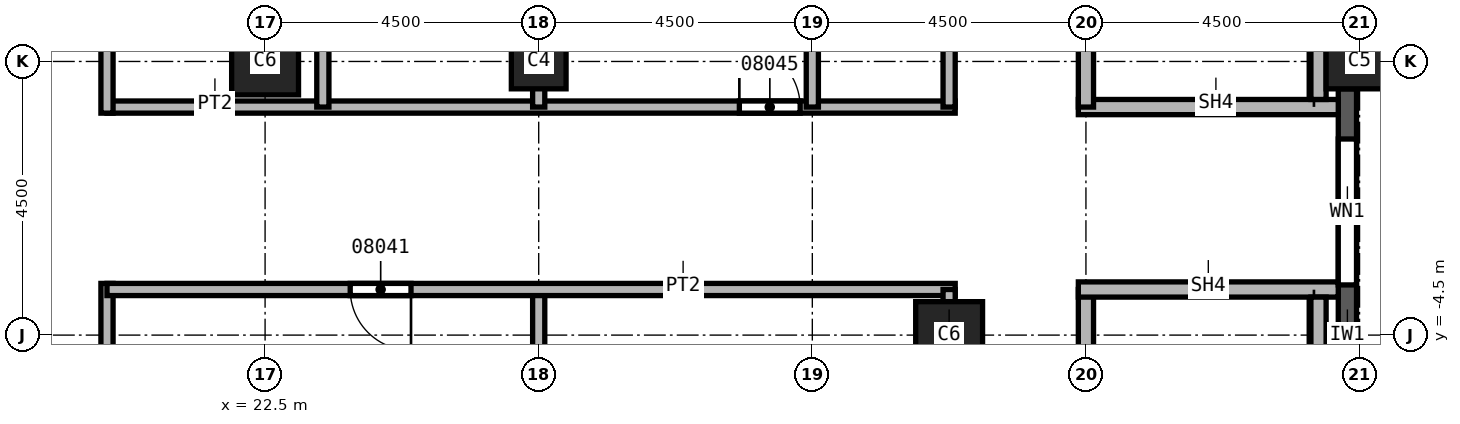
"""IFC4 building model, lengths in metres.
Left out: names, types, materials, properties, quantities, classifications, styles, units other than length and angle.
Written with IfcOpenShell. Run it as: python <this file> out.ifc"""

import sys

from ifc_helpers import new_model, si_unit, direction, frame, frame_2d, origin, origin_2d, place, context, subcontext, project, spatial, rectangle, extrude, element, fill, save


model = new_model("IFC4")
c1 = context("Model", 3, precision=1e-05, world=origin(), true_north=direction((0.0, 1.0)))
c2 = subcontext(c1, "Body", "Model", "MODEL_VIEW")
j1 = project(units=[si_unit("LENGTHUNIT", "METRE"), si_unit("PLANEANGLEUNIT", "RADIAN")], contexts=[c1])
p1 = place(None, origin())
s1 = spatial("IfcSite", under=j1, at=p1, CompositionType="ELEMENT")
p2 = place(p1, origin())
s2 = spatial("IfcBuilding", under=s1, at=p2, CompositionType="ELEMENT")
p3 = place(p2, frame((0.0, 0.0, 150.0)))
s3 = spatial("IfcBuildingStorey", under=s2, at=p3, CompositionType="ELEMENT", Elevation=150.0)
p4 = place(p3, frame((40.5, 0.0, 0.0), z_axis=(0.0, 0.0, 1.0), x_axis=(0.0, 1.0, 0.0)))
e1 = element("IfcColumn", 1, at=p4, inside=s3, PredefinedType="COLUMN", context=c2, shape_type="SweptSolid", body=[
    extrude(rectangle(XDim=0.9, YDim=1.1, at=origin_2d()), origin(), (0.0, 0.0, 1.0), 3.7),
])
for number, where, z_axis, x_axis in (
    (2, (33.75, -4.5, 0.0), (0.0, 0.0, 1.0), (1.0, 0.0, 0.0)),
    (3, (22.5, 0.0, 0.0), (0.0, 0.0, 1.0), (1.0, 0.0, 0.0)),
):
    element("IfcColumn", number, at=place(p3, frame(where, z_axis=z_axis, x_axis=x_axis)), inside=s3, PredefinedType="COLUMN", context=c2, shape_type="SweptSolid", body=[
        extrude(rectangle(XDim=1.1, YDim=1.1, at=origin_2d()), origin(), (0.0, 0.0, 1.0), 3.7),
    ])
p5 = place(p3, frame((27.0, 0.0, 0.0), z_axis=(0.0, 0.0, 1.0), x_axis=(1.0, 0.0, 0.0)))
e4 = element("IfcColumn", 4, at=p5, inside=s3, PredefinedType="COLUMN", context=c2, shape_type="SweptSolid", body=[
    extrude(rectangle(XDim=0.9, YDim=0.9, at=origin_2d()), origin(), (0.0, 0.0, 1.0), 3.7),
])
p6 = place(p3, frame((40.3, -8.55, 0.0), z_axis=(0.0, 0.0, 1.0), x_axis=(0.0, 1.0, 0.0)))
e5 = element("IfcWall", 5, at=p6, inside=s3, PredefinedType="SOLIDWALL", context=c2, shape_type="SweptSolid", body=[
    extrude(rectangle(XDim=8.1, YDim=0.3, at=frame_2d((4.05, 0.0))), origin(), (0.0, 0.0, 1.0), 3.1),
])
p7 = place(p6, frame((0.825, 0.0, 0.8)))
e6 = element("IfcOpeningElement", 6, at=p7, cuts=e5, PredefinedType="OPENING", context=c2, shape_type="SweptSolid", body=[
    extrude(rectangle(XDim=2.4, YDim=1.95, at=frame_2d((1.2, 0.975))), frame((0.0, 0.15, 0.0), z_axis=(0.0, -1.0, 0.0), x_axis=(1.0, 0.0, 0.0)), (0.0, 0.0, 1.0), 0.3),
])
p8 = place(p6, frame((4.875, 0.0, 0.8)))
e7 = element("IfcOpeningElement", 7, at=p8, cuts=e5, PredefinedType="OPENING", context=c2, shape_type="SweptSolid", body=[
    extrude(rectangle(XDim=2.4, YDim=1.95, at=frame_2d((1.2, 0.975))), frame((0.0, 0.15, 0.0), z_axis=(0.0, -1.0, 0.0), x_axis=(1.0, 0.0, 0.0)), (0.0, 0.0, 1.0), 0.3),
])
p9 = place(p3, frame((19.9, -3.65, 0.0), z_axis=(0.0, 0.0, 1.0), x_axis=(0.0, -1.0, 0.0)))
e8 = element("IfcWall", 8, at=p9, inside=s3, PredefinedType="PARTITIONING", context=c2, shape_type="SweptSolid", body=[
    extrude(rectangle(XDim=19.6, YDim=0.2, at=frame_2d((9.8, 0.0))), origin(), (0.0, 0.0, 1.0), 3.7),
])
p10 = place(p9, frame((17.35, 0.0, 0.0)))
e9 = element("IfcOpeningElement", 9, at=p10, cuts=e8, PredefinedType="OPENING", context=c2, shape_type="SweptSolid", body=[
    extrude(rectangle(XDim=1.0, YDim=2.1, at=frame_2d((0.5, 1.05))), frame((0.0, 0.1, 0.0), z_axis=(0.0, -1.0, 0.0), x_axis=(1.0, 0.0, 0.0)), (0.0, 0.0, 1.0), 0.2),
])
p11 = place(p9, frame((9.4, 0.0, 0.0)))
e10 = element("IfcOpeningElement", 10, at=p11, cuts=e8, PredefinedType="OPENING", context=c2, shape_type="SweptSolid", body=[
    extrude(rectangle(XDim=1.0, YDim=2.1, at=frame_2d((0.5, 1.05))), frame((0.0, 0.1, 0.0), z_axis=(0.0, -1.0, 0.0), x_axis=(1.0, 0.0, 0.0)), (0.0, 0.0, 1.0), 0.2),
])
p12 = place(p3, frame((19.9, -0.75, 0.0), z_axis=(0.0, 0.0, 1.0), x_axis=(1.0, 0.0, 0.0)))
e11 = element("IfcWall", 11, at=p12, inside=s3, PredefinedType="PARTITIONING", context=c2, shape_type="SweptSolid", body=[
    extrude(rectangle(XDim=13.95, YDim=0.2, at=frame_2d((6.975, 0.0))), origin(), (0.0, 0.0, 1.0), 3.7),
])
p13 = place(p12, frame((10.4, 0.0, 0.0)))
e12 = element("IfcOpeningElement", 12, at=p13, cuts=e11, PredefinedType="OPENING", context=c2, shape_type="SweptSolid", body=[
    extrude(rectangle(XDim=1.0, YDim=2.1, at=frame_2d((0.5, 1.05))), frame((0.0, 0.1, 0.0), z_axis=(0.0, -1.0, 0.0), x_axis=(1.0, 0.0, 0.0)), (0.0, 0.0, 1.0), 0.2),
])
p14 = place(p3, frame((19.9, 23.25, 0.0), z_axis=(0.0, 0.0, 1.0), x_axis=(0.0, -1.0, 0.0)))
e13 = element("IfcWall", 13, at=p14, inside=s3, PredefinedType="PARTITIONING", context=c2, shape_type="SweptSolid", body=[
    extrude(rectangle(XDim=24.1, YDim=0.2, at=frame_2d((12.05, 0.0))), origin(), (0.0, 0.0, 1.0), 3.7),
])
p15 = place(p14, frame((12.6, 0.0, 0.0)))
e14 = element("IfcOpeningElement", 14, at=p15, cuts=e13, PredefinedType="OPENING", context=c2, shape_type="SweptSolid", body=[
    extrude(rectangle(XDim=1.0, YDim=2.1, at=frame_2d((0.5, 1.05))), frame((0.0, 0.1, 0.0), z_axis=(0.0, -1.0, 0.0), x_axis=(1.0, 0.0, 0.0)), (0.0, 0.0, 1.0), 0.2),
])
p16 = place(p14, frame((5.05, 0.0, 0.0)))
e15 = element("IfcOpeningElement", 15, at=p16, cuts=e13, PredefinedType="OPENING", context=c2, shape_type="SweptSolid", body=[
    extrude(rectangle(XDim=1.0, YDim=2.1, at=frame_2d((0.5, 1.05))), frame((0.0, 0.1, 0.0), z_axis=(0.0, -1.0, 0.0), x_axis=(1.0, 0.0, 0.0)), (0.0, 0.0, 1.0), 0.2),
])
p17 = place(p3, frame((23.45, 15.85, 0.0), z_axis=(0.0, 0.0, 1.0), x_axis=(0.0, -1.0, 0.0)))
e16 = element("IfcWall", 16, at=p17, inside=s3, PredefinedType="PARTITIONING", context=c2, shape_type="SweptSolid", body=[
    extrude(rectangle(XDim=16.6, YDim=0.2, at=frame_2d((8.3, 0.0))), origin(), (0.0, 0.0, 1.0), 3.7),
])
p18 = place(p17, frame((10.45, 0.0, 0.0)))
e17 = element("IfcOpeningElement", 17, at=p18, cuts=e16, PredefinedType="OPENING", context=c2, shape_type="SweptSolid", body=[
    extrude(rectangle(XDim=1.0, YDim=2.1, at=frame_2d((0.5, 1.05))), frame((0.0, 0.1, 0.0), z_axis=(0.0, -1.0, 0.0), x_axis=(1.0, 0.0, 0.0)), (0.0, 0.0, 1.0), 0.2),
])
p19 = place(p3, frame((27.0, -3.75, 0.0), z_axis=(0.0, 0.0, 1.0), x_axis=(0.0, -1.0, 0.0)))
e18 = element("IfcWall", 18, at=p19, inside=s3, PredefinedType="PARTITIONING", context=c2, shape_type="SweptSolid", body=[
    extrude(rectangle(XDim=13.7, YDim=0.2, at=frame_2d((6.85, 0.0))), origin(), (0.0, 0.0, 1.0), 3.7),
])
p20 = place(p3, frame((27.0, 17.45, 0.0), z_axis=(0.0, 0.0, 1.0), x_axis=(0.0, -1.0, 0.0)))
e19 = element("IfcWall", 19, at=p20, inside=s3, PredefinedType="PARTITIONING", context=c2, shape_type="SweptSolid", body=[
    extrude(rectangle(XDim=18.2, YDim=0.2, at=frame_2d((9.1, 0.0))), origin(), (0.0, 0.0, 1.0), 3.7),
])
p21 = place(p3, frame((33.85, -3.75, 0.0), z_axis=(0.0, 0.0, 1.0), x_axis=(-1.0, 0.0, 0.0)))
e20 = element("IfcWall", 20, at=p21, inside=s3, PredefinedType="PARTITIONING", context=c2, shape_type="SweptSolid", body=[
    extrude(rectangle(XDim=13.95, YDim=0.2, at=frame_2d((6.975, 0.0))), origin(), (0.0, 0.0, 1.0), 3.7),
])
p22 = place(p21, frame((8.95, 0.0, 0.0)))
e21 = element("IfcOpeningElement", 21, at=p22, cuts=e20, PredefinedType="OPENING", context=c2, shape_type="SweptSolid", body=[
    extrude(rectangle(XDim=1.0, YDim=2.1, at=frame_2d((0.5, 1.05))), frame((0.0, 0.1, 0.0), z_axis=(0.0, -1.0, 0.0), x_axis=(1.0, 0.0, 0.0)), (0.0, 0.0, 1.0), 0.2),
])
p23 = place(p3, frame((31.5, 17.45, 0.0), z_axis=(0.0, 0.0, 1.0), x_axis=(0.0, -1.0, 0.0)))
e22 = element("IfcWall", 22, at=p23, inside=s3, PredefinedType="PARTITIONING", context=c2, shape_type="SweptSolid", body=[
    extrude(rectangle(XDim=18.2, YDim=0.2, at=frame_2d((9.1, 0.0))), origin(), (0.0, 0.0, 1.0), 3.7),
])
p24 = place(p3, frame((33.75, -11.25, 0.0), z_axis=(0.0, 0.0, 1.0), x_axis=(0.0, 1.0, 0.0)))
e23 = element("IfcWall", 23, at=p24, inside=s3, PredefinedType="PARTITIONING", context=c2, shape_type="SweptSolid", body=[
    extrude(rectangle(XDim=7.5, YDim=0.2, at=frame_2d((3.75, 0.0))), origin(), (0.0, 0.0, 1.0), 3.7),
])
p25 = place(p24, frame((3.25, 0.0, 0.0)))
e24 = element("IfcOpeningElement", 24, at=p25, cuts=e23, PredefinedType="OPENING", context=c2, shape_type="SweptSolid", body=[
    extrude(rectangle(XDim=1.0, YDim=2.1, at=frame_2d((0.5, 1.05))), frame((0.0, 0.1, 0.0), z_axis=(0.0, -1.0, 0.0), x_axis=(1.0, 0.0, 0.0)), (0.0, 0.0, 1.0), 0.2),
])
p26 = place(p3, frame((33.75, -0.75, 0.0), z_axis=(0.0, 0.0, 1.0), x_axis=(0.0, 1.0, 0.0)))
e25 = element("IfcWall", 25, at=p26, inside=s3, PredefinedType="PARTITIONING", context=c2, shape_type="SweptSolid", body=[
    extrude(rectangle(XDim=7.5, YDim=0.2, at=frame_2d((3.75, 0.0))), origin(), (0.0, 0.0, 1.0), 3.7),
])
p27 = place(p26, frame((3.4, 0.0, 0.0)))
e26 = element("IfcOpeningElement", 26, at=p27, cuts=e25, PredefinedType="OPENING", context=c2, shape_type="SweptSolid", body=[
    extrude(rectangle(XDim=1.0, YDim=2.1, at=frame_2d((0.5, 1.05))), frame((0.0, 0.1, 0.0), z_axis=(0.0, -1.0, 0.0), x_axis=(1.0, 0.0, 0.0)), (0.0, 0.0, 1.0), 0.2),
])
p28 = place(p3, frame((35.875, -0.75, 0.0), z_axis=(0.0, 0.0, 1.0), x_axis=(1.0, 0.0, 0.0)))
e27 = element("IfcWall", 27, at=p28, inside=s3, PredefinedType="SOLIDWALL", context=c2, shape_type="SweptSolid", body=[
    extrude(rectangle(XDim=4.275, YDim=0.25, at=frame_2d((2.137, 0.0))), origin(), (0.0, 0.0, 1.0), 3.7),
])
p29 = place(p3, frame((36.0, -11.375, 0.0), z_axis=(0.0, 0.0, 1.0), x_axis=(0.0, 1.0, 0.0)))
e28 = element("IfcWall", 28, at=p29, inside=s3, PredefinedType="SOLIDWALL", context=c2, shape_type="SweptSolid", body=[
    extrude(rectangle(XDim=7.625, YDim=0.25, at=frame_2d((3.812, 0.0))), origin(), (0.0, 0.0, 1.0), 3.7),
])
p30 = place(p29, frame((0.4, 0.0, 0.0)))
e29 = element("IfcOpeningElement", 29, at=p30, cuts=e28, PredefinedType="OPENING", context=c2, shape_type="SweptSolid", body=[
    extrude(rectangle(XDim=1.2, YDim=2.1, at=frame_2d((0.6, 1.05))), frame((0.0, 0.125, 0.0), z_axis=(0.0, -1.0, 0.0), x_axis=(1.0, 0.0, 0.0)), (0.0, 0.0, 1.0), 0.25),
])
p31 = place(p3, frame((36.0, -0.75, 0.0), z_axis=(0.0, 0.0, 1.0), x_axis=(0.0, 1.0, 0.0)))
e30 = element("IfcWall", 30, at=p31, inside=s3, PredefinedType="SOLIDWALL", context=c2, shape_type="SweptSolid", body=[
    extrude(rectangle(XDim=7.625, YDim=0.25, at=frame_2d((3.812, 0.0))), origin(), (0.0, 0.0, 1.0), 3.7),
])
p32 = place(p31, frame((5.95, 0.0, 0.0)))
e31 = element("IfcOpeningElement", 31, at=p32, cuts=e30, PredefinedType="OPENING", context=c2, shape_type="SweptSolid", body=[
    extrude(rectangle(XDim=1.2, YDim=2.1, at=frame_2d((0.6, 1.05))), frame((0.0, 0.125, 0.0), z_axis=(0.0, -1.0, 0.0), x_axis=(1.0, 0.0, 0.0)), (0.0, 0.0, 1.0), 0.25),
])
p33 = place(p3, frame((40.15, -3.75, 0.0), z_axis=(0.0, 0.0, 1.0), x_axis=(-1.0, 0.0, 0.0)))
e32 = element("IfcWall", 32, at=p33, inside=s3, PredefinedType="SOLIDWALL", context=c2, shape_type="SweptSolid", body=[
    extrude(rectangle(XDim=4.275, YDim=0.25, at=frame_2d((2.137, 0.0))), origin(), (0.0, 0.0, 1.0), 3.7),
])
for number, where, z_axis, x_axis in (
    (33, (39.825, -11.125, 0.0), (0.0, 0.0, 1.0), (0.0, 1.0, 0.0)),
    (34, (39.825, -0.625, 0.0), (0.0, 0.0, 1.0), (0.0, 1.0, 0.0)),
):
    element("IfcWall", number, at=place(p3, frame(where, z_axis=z_axis, x_axis=x_axis)), inside=s3, PredefinedType="SOLIDWALL", context=c2, shape_type="SweptSolid", body=[
        extrude(rectangle(XDim=7.25, YDim=0.25, at=frame_2d((3.625, 0.0))), origin(), (0.0, 0.0, 1.0), 3.7),
    ])
p34 = place(p8, origin())
e35 = element("IfcWindow", 35, at=p34, inside=s3, PartitioningType="SINGLE_PANEL", PredefinedType="WINDOW", context=c2, shape_type="SweptSolid", body=[
    extrude(rectangle(XDim=2.4, YDim=1.95, at=frame_2d((1.2, 0.975))), frame((0.0, 0.03, 0.0), z_axis=(0.0, -1.0, 0.0), x_axis=(1.0, 0.0, 0.0)), (0.0, 0.0, 1.0), 0.06),
])
fill(e7, e35)
p35 = place(p22, origin())
e36 = element("IfcDoor", 36, at=p35, inside=s3, OperationType="SINGLE_SWING_RIGHT", PredefinedType="DOOR", context=c2, shape_type="SweptSolid", body=[
    extrude(rectangle(XDim=1.0, YDim=2.1, at=frame_2d((0.5, 1.05))), frame((0.0, 0.025, 0.0), z_axis=(0.0, -1.0, 0.0), x_axis=(1.0, 0.0, 0.0)), (0.0, 0.0, 1.0), 0.05),
])
fill(e21, e36)
p36 = place(p13, origin())
e37 = element("IfcDoor", 37, at=p36, inside=s3, OperationType="SINGLE_SWING_RIGHT", PredefinedType="DOOR", context=c2, shape_type="SweptSolid", body=[
    extrude(rectangle(XDim=1.0, YDim=2.1, at=frame_2d((0.5, 1.05))), frame((0.0, 0.025, 0.0), z_axis=(0.0, -1.0, 0.0), x_axis=(1.0, 0.0, 0.0)), (0.0, 0.0, 1.0), 0.05),
])
fill(e12, e37)
save(model, sys.argv[1])
